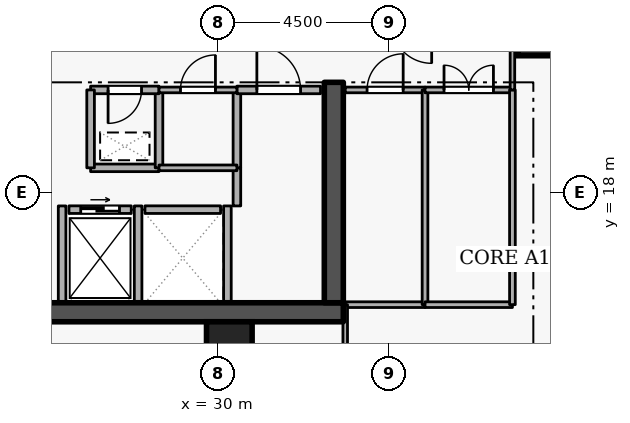
"""IFC4 building model, lengths in metres.
Left out: names, types, materials, properties, quantities, classifications, styles, units other than length and angle.
Written with IfcOpenShell. Run it as: python <this file> out.ifc"""

import sys

from ifc_helpers import new_model, si_unit, direction, frame, frame_2d, origin, origin_2d, place, context, subcontext, project, spatial, rectangle, extrude, element, fill, save


model = new_model("IFC4")
c1 = context("Model", 3, precision=1e-05, world=origin(), true_north=direction((0.0, 1.0)))
c2 = subcontext(c1, "Body", "Model", "MODEL_VIEW")
j1 = project(units=[si_unit("LENGTHUNIT", "METRE"), si_unit("PLANEANGLEUNIT", "RADIAN")], contexts=[c1])
p1 = place(None, origin())
s1 = spatial("IfcSite", under=j1, at=p1, CompositionType="ELEMENT")
p2 = place(p1, origin())
s2 = spatial("IfcBuilding", under=s1, at=p2, CompositionType="ELEMENT")
p3 = place(p2, frame((0.0, 0.0, 130.5)))
s3 = spatial("IfcBuildingStorey", under=s2, at=p3, CompositionType="ELEMENT", Elevation=130.5)
p4 = place(p3, frame((17.7, 14.85, 0.0), z_axis=(0.0, 0.0, 1.0), x_axis=(1.0, 0.0, 0.0)))
e1 = element("IfcWall", 1, at=p4, inside=s3, PredefinedType="SHEAR", context=c2, shape_type="SweptSolid", body=[
    extrude(rectangle(XDim=15.6, YDim=0.5, at=frame_2d((7.8, 0.0))), origin(), (0.0, 0.0, 1.0), 3.6),
])
p5 = place(p3, frame((33.05, 15.1, 0.0), z_axis=(0.0, 0.0, 1.0), x_axis=(0.0, 1.0, 0.0)))
e2 = element("IfcWall", 2, at=p5, inside=s3, PredefinedType="SHEAR", context=c2, shape_type="SweptSolid", body=[
    extrude(rectangle(XDim=5.8, YDim=0.5, at=frame_2d((2.9, 0.0))), origin(), (0.0, 0.0, 1.0), 3.6),
])
for number, where, z_axis, x_axis in (
    (3, (38.5, 22.2, 0.0), (0.0, 0.0, 1.0), (1.0, 0.0, 0.0)),
    (4, (30.3, 14.0, 0.0), (0.0, 0.0, 1.0), (1.0, 0.0, 0.0)),
):
    element("IfcColumn", number, at=place(p3, frame(where, z_axis=z_axis, x_axis=x_axis)), inside=s3, PredefinedType="COLUMN", context=c2, shape_type="SweptSolid", body=[
        extrude(rectangle(XDim=1.2, YDim=1.2, at=origin_2d()), origin(), (0.0, 0.0, 1.0), 3.6),
    ])
p6 = place(p3, frame((26.08, 17.55, 0.0), z_axis=(0.0, 0.0, 1.0), x_axis=(1.0, 0.0, 0.0)))
e5 = element("IfcWall", 5, at=p6, inside=s3, PredefinedType="STANDARD", context=c2, shape_type="SweptSolid", body=[
    extrude(rectangle(XDim=1.64, YDim=0.2, at=frame_2d((0.82, 0.0))), origin(), (0.0, 0.0, 1.0), 3.34),
])
p7 = place(p6, frame((0.31, 0.0, 0.0)))
e6 = element("IfcOpeningElement", 6, at=p7, cuts=e5, PredefinedType="OPENING", context=c2, shape_type="SweptSolid", body=[
    extrude(rectangle(XDim=1.02, YDim=2.06, at=frame_2d((0.51, 1.03))), frame((0.0, 0.11, 0.0), z_axis=(0.0, -1.0, 0.0), x_axis=(1.0, 0.0, 0.0)), (0.0, 0.0, 1.0), 0.22),
])
p8 = place(p3, frame((28.08, 17.55, 0.0), z_axis=(0.0, 0.0, 1.0), x_axis=(1.0, 0.0, 0.0)))
e7 = element("IfcWall", 7, at=p8, inside=s3, PredefinedType="STANDARD", context=c2, shape_type="SweptSolid", body=[
    extrude(rectangle(XDim=1.99, YDim=0.2, at=frame_2d((0.995, 0.0))), origin(), (0.0, 0.0, 1.0), 3.34),
])
for number, where, z_axis, x_axis in (
    (8, (27.9, 15.112, 0.0), (0.0, 0.0, 1.0), (0.0, 1.0, 0.0)),
    (9, (25.9, 15.112, 0.0), (0.0, 0.0, 1.0), (0.0, 1.0, 0.0)),
    (10, (30.25, 15.112, 0.0), (0.0, 0.0, 1.0), (0.0, 1.0, 0.0)),
):
    element("IfcWall", number, at=place(p3, frame(where, z_axis=z_axis, x_axis=x_axis)), inside=s3, PredefinedType="STANDARD", context=c2, shape_type="SweptSolid", body=[
        extrude(rectangle(XDim=2.536, YDim=0.2, at=frame_2d((1.268, 0.0))), origin(), (0.0, 0.0, 1.0), 3.34),
    ])
p9 = place(p3, frame((26.65, 18.65, 0.0), z_axis=(0.0, 0.0, 1.0), x_axis=(1.0, 0.0, 0.0)))
e11 = element("IfcWall", 11, at=p9, inside=s3, PredefinedType="STANDARD", context=c2, shape_type="SweptSolid", body=[
    extrude(rectangle(XDim=1.8, YDim=0.2, at=frame_2d((0.9, 0.0))), origin(), (0.0, 0.0, 1.0), 3.34),
])
p10 = place(p3, frame((28.45, 18.65, 0.0), z_axis=(0.0, 0.0, 1.0), x_axis=(0.0, 1.0, 0.0)))
e12 = element("IfcWall", 12, at=p10, inside=s3, PredefinedType="STANDARD", context=c2, shape_type="SweptSolid", body=[
    extrude(rectangle(XDim=2.05, YDim=0.2, at=frame_2d((1.025, 0.0))), origin(), (0.0, 0.0, 1.0), 3.34),
])
p11 = place(p3, frame((28.45, 20.7, 0.0), z_axis=(0.0, 0.0, 1.0), x_axis=(-1.0, 0.0, 0.0)))
e13 = element("IfcWall", 13, at=p11, inside=s3, PredefinedType="STANDARD", context=c2, shape_type="SweptSolid", body=[
    extrude(rectangle(XDim=1.8, YDim=0.2, at=frame_2d((0.9, 0.0))), origin(), (0.0, 0.0, 1.0), 3.34),
])
p12 = place(p11, frame((0.46, 0.0, 0.0)))
e14 = element("IfcOpeningElement", 14, at=p12, cuts=e13, PredefinedType="OPENING", context=c2, shape_type="SweptSolid", body=[
    extrude(rectangle(XDim=0.88, YDim=2.04, at=frame_2d((0.44, 1.02))), frame((0.0, 0.11, 0.0), z_axis=(0.0, -1.0, 0.0), x_axis=(1.0, 0.0, 0.0)), (0.0, 0.0, 1.0), 0.22),
])
p13 = place(p3, frame((26.65, 20.7, 0.0), z_axis=(0.0, 0.0, 1.0), x_axis=(0.0, -1.0, 0.0)))
e15 = element("IfcWall", 15, at=p13, inside=s3, PredefinedType="STANDARD", context=c2, shape_type="SweptSolid", body=[
    extrude(rectangle(XDim=2.05, YDim=0.2, at=frame_2d((1.025, 0.0))), origin(), (0.0, 0.0, 1.0), 3.34),
])
p14 = place(p3, frame((30.5, 17.648, 0.0), z_axis=(0.0, 0.0, 1.0), x_axis=(0.0, 1.0, 0.0)))
e16 = element("IfcWall", 16, at=p14, inside=s3, PredefinedType="STANDARD", context=c2, shape_type="SweptSolid", body=[
    extrude(rectangle(XDim=1.002, YDim=0.2, at=frame_2d((0.501, 0.0))), origin(), (0.0, 0.0, 1.0), 3.34),
])
p15 = place(p3, frame((30.5, 18.65, 0.0), z_axis=(0.0, 0.0, 1.0), x_axis=(0.0, 1.0, 0.0)))
e17 = element("IfcWall", 17, at=p15, inside=s3, PredefinedType="STANDARD", context=c2, shape_type="SweptSolid", body=[
    extrude(rectangle(XDim=2.05, YDim=0.2, at=frame_2d((1.025, 0.0))), origin(), (0.0, 0.0, 1.0), 3.34),
])
p16 = place(p3, frame((30.5, 20.7, 0.0), z_axis=(0.0, 0.0, 1.0), x_axis=(1.0, 0.0, 0.0)))
e18 = element("IfcWall", 18, at=p16, inside=s3, PredefinedType="STANDARD", context=c2, shape_type="SweptSolid", body=[
    extrude(rectangle(XDim=2.2, YDim=0.2, at=frame_2d((1.1, 0.0))), origin(), (0.0, 0.0, 1.0), 3.34),
])
p17 = place(p16, frame((0.525, 0.0, 0.0)))
e19 = element("IfcOpeningElement", 19, at=p17, cuts=e18, PredefinedType="OPENING", context=c2, shape_type="SweptSolid", body=[
    extrude(rectangle(XDim=1.15, YDim=2.1, at=frame_2d((0.575, 1.05))), frame((0.0, 0.11, 0.0), z_axis=(0.0, -1.0, 0.0), x_axis=(1.0, 0.0, 0.0)), (0.0, 0.0, 1.0), 0.22),
])
p18 = place(p3, frame((30.5, 18.65, 0.0), z_axis=(0.0, 0.0, 1.0), x_axis=(-1.0, 0.0, 0.0)))
e20 = element("IfcWall", 20, at=p18, inside=s3, PredefinedType="PARTITIONING", context=c2, shape_type="SweptSolid", body=[
    extrude(rectangle(XDim=2.05, YDim=0.15, at=frame_2d((1.025, 0.0))), origin(), (0.0, 0.0, 1.0), 3.34),
])
p19 = place(p3, frame((28.45, 20.7, 0.0), z_axis=(0.0, 0.0, 1.0), x_axis=(1.0, 0.0, 0.0)))
e21 = element("IfcWall", 21, at=p19, inside=s3, PredefinedType="PARTITIONING", context=c2, shape_type="SweptSolid", body=[
    extrude(rectangle(XDim=2.05, YDim=0.15, at=frame_2d((1.025, 0.0))), origin(), (0.0, 0.0, 1.0), 3.34),
])
p20 = place(p19, frame((0.565, 0.0, 0.0)))
e22 = element("IfcOpeningElement", 22, at=p20, cuts=e21, PredefinedType="OPENING", context=c2, shape_type="SweptSolid", body=[
    extrude(rectangle(XDim=0.92, YDim=2.08, at=frame_2d((0.46, 1.04))), frame((0.0, 0.085, 0.0), z_axis=(0.0, -1.0, 0.0), x_axis=(1.0, 0.0, 0.0)), (0.0, 0.0, 1.0), 0.17),
])
p21 = place(p3, frame((35.45, 15.05, 0.0), z_axis=(0.0, 0.0, 1.0), x_axis=(-1.0, 0.0, 0.0)))
e23 = element("IfcWall", 23, at=p21, inside=s3, PredefinedType="PARTITIONING", context=c2, shape_type="SweptSolid", body=[
    extrude(rectangle(XDim=2.1, YDim=0.15, at=frame_2d((1.05, 0.0))), origin(), (0.0, 0.0, 1.0), 3.34),
])
p22 = place(p3, frame((33.35, 20.7, 0.0), z_axis=(0.0, 0.0, 1.0), x_axis=(1.0, 0.0, 0.0)))
e24 = element("IfcWall", 24, at=p22, inside=s3, PredefinedType="PARTITIONING", context=c2, shape_type="SweptSolid", body=[
    extrude(rectangle(XDim=2.1, YDim=0.15, at=frame_2d((1.05, 0.0))), origin(), (0.0, 0.0, 1.0), 3.34),
])
p23 = place(p22, frame((0.575, 0.0, 0.0)))
e25 = element("IfcOpeningElement", 25, at=p23, cuts=e24, PredefinedType="OPENING", context=c2, shape_type="SweptSolid", body=[
    extrude(rectangle(XDim=0.95, YDim=2.1, at=frame_2d((0.475, 1.05))), frame((0.0, 0.085, 0.0), z_axis=(0.0, -1.0, 0.0), x_axis=(1.0, 0.0, 0.0)), (0.0, 0.0, 1.0), 0.17),
])
p24 = place(p3, frame((35.45, 20.7, 0.0), z_axis=(0.0, 0.0, 1.0), x_axis=(0.0, -1.0, 0.0)))
e26 = element("IfcWall", 26, at=p24, inside=s3, PredefinedType="PARTITIONING", context=c2, shape_type="SweptSolid", body=[
    extrude(rectangle(XDim=5.65, YDim=0.15, at=frame_2d((2.825, 0.0))), origin(), (0.0, 0.0, 1.0), 3.34),
])
p25 = place(p3, frame((37.75, 15.05, 0.0), z_axis=(0.0, 0.0, 1.0), x_axis=(-1.0, 0.0, 0.0)))
e27 = element("IfcWall", 27, at=p25, inside=s3, PredefinedType="PARTITIONING", context=c2, shape_type="SweptSolid", body=[
    extrude(rectangle(XDim=2.3, YDim=0.15, at=frame_2d((1.15, 0.0))), origin(), (0.0, 0.0, 1.0), 3.34),
])
p26 = place(p3, frame((35.45, 20.7, 0.0), z_axis=(0.0, 0.0, 1.0), x_axis=(1.0, 0.0, 0.0)))
e28 = element("IfcWall", 28, at=p26, inside=s3, PredefinedType="PARTITIONING", context=c2, shape_type="SweptSolid", body=[
    extrude(rectangle(XDim=2.3, YDim=0.15, at=frame_2d((1.15, 0.0))), origin(), (0.0, 0.0, 1.0), 3.34),
])
p27 = place(p26, frame((0.5, 0.0, 0.0)))
e29 = element("IfcOpeningElement", 29, at=p27, cuts=e28, PredefinedType="OPENING", context=c2, shape_type="SweptSolid", body=[
    extrude(rectangle(XDim=1.3, YDim=2.12, at=frame_2d((0.65, 1.06))), frame((0.0, 0.085, 0.0), z_axis=(0.0, -1.0, 0.0), x_axis=(1.0, 0.0, 0.0)), (0.0, 0.0, 1.0), 0.17),
])
p28 = place(p3, frame((37.75, 20.7, 0.0), z_axis=(0.0, 0.0, 1.0), x_axis=(0.0, -1.0, 0.0)))
e30 = element("IfcWall", 30, at=p28, inside=s3, PredefinedType="PARTITIONING", context=c2, shape_type="SweptSolid", body=[
    extrude(rectangle(XDim=5.65, YDim=0.15, at=frame_2d((2.825, 0.0))), origin(), (0.0, 0.0, 1.0), 3.34),
])
p29 = place(p3, frame((33.35, 3.28, 0.0), z_axis=(0.0, 0.0, 1.0), x_axis=(0.0, 1.0, 0.0)))
e31 = element("IfcWall", 31, at=p29, inside=s3, PredefinedType="PARTITIONING", context=c2, shape_type="SweptSolid", body=[
    extrude(rectangle(XDim=11.77, YDim=0.12, at=frame_2d((5.885, 0.0))), origin(), (0.0, 0.0, 1.0), 2.545),
])
p30 = place(p3, frame((37.75, 20.7, 0.0), z_axis=(0.0, 0.0, 1.0), x_axis=(0.0, 1.0, 0.0)))
e32 = element("IfcWall", 32, at=p30, inside=s3, PredefinedType="PARTITIONING", context=c2, shape_type="SweptSolid", body=[
    extrude(rectangle(XDim=1.75, YDim=0.12, at=frame_2d((0.875, 0.0))), origin(), (0.0, 0.0, 1.0), 3.34),
])
p31 = place(p7, origin())
e33 = element("IfcDoor", 33, at=p31, inside=s3, OperationType="SLIDING_TO_LEFT", PredefinedType="DOOR", context=c2, shape_type="SweptSolid", body=[
    extrude(rectangle(XDim=1.02, YDim=2.06, at=frame_2d((0.51, 1.03))), frame((0.0, 0.025, 0.0), z_axis=(0.0, -1.0, 0.0), x_axis=(1.0, 0.0, 0.0)), (0.0, 0.0, 1.0), 0.05),
])
fill(e6, e33)
p32 = place(p12, origin())
e34 = element("IfcDoor", 34, at=p32, inside=s3, OperationType="SINGLE_SWING_RIGHT", PredefinedType="DOOR", context=c2, shape_type="SweptSolid", body=[
    extrude(rectangle(XDim=0.88, YDim=2.04, at=frame_2d((0.44, 1.02))), frame((0.0, 0.025, 0.0), z_axis=(0.0, -1.0, 0.0), x_axis=(1.0, 0.0, 0.0)), (0.0, 0.0, 1.0), 0.05),
])
fill(e14, e34)
p33 = place(p20, origin())
e35 = element("IfcDoor", 35, at=p33, inside=s3, OperationType="SINGLE_SWING_RIGHT", PredefinedType="DOOR", context=c2, shape_type="SweptSolid", body=[
    extrude(rectangle(XDim=0.92, YDim=2.08, at=frame_2d((0.46, 1.04))), frame((0.0, 0.025, 0.0), z_axis=(0.0, -1.0, 0.0), x_axis=(1.0, 0.0, 0.0)), (0.0, 0.0, 1.0), 0.05),
])
fill(e22, e35)
p34 = place(p17, origin())
e36 = element("IfcDoor", 36, at=p34, inside=s3, OperationType="SINGLE_SWING_LEFT", PredefinedType="DOOR", context=c2, shape_type="SweptSolid", body=[
    extrude(rectangle(XDim=1.15, YDim=2.1, at=frame_2d((0.575, 1.05))), frame((0.0, 0.025, 0.0), z_axis=(0.0, -1.0, 0.0), x_axis=(1.0, 0.0, 0.0)), (0.0, 0.0, 1.0), 0.05),
])
fill(e19, e36)
p35 = place(p23, origin())
e37 = element("IfcDoor", 37, at=p35, inside=s3, OperationType="SINGLE_SWING_RIGHT", PredefinedType="DOOR", context=c2, shape_type="SweptSolid", body=[
    extrude(rectangle(XDim=0.95, YDim=2.1, at=frame_2d((0.475, 1.05))), frame((0.0, 0.025, 0.0), z_axis=(0.0, -1.0, 0.0), x_axis=(1.0, 0.0, 0.0)), (0.0, 0.0, 1.0), 0.05),
])
fill(e25, e37)
p36 = place(p27, origin())
e38 = element("IfcDoor", 38, at=p36, inside=s3, OperationType="DOUBLE_DOOR_SINGLE_SWING", PredefinedType="DOOR", context=c2, shape_type="SweptSolid", body=[
    extrude(rectangle(XDim=1.3, YDim=2.12, at=frame_2d((0.65, 1.06))), frame((0.0, 0.025, 0.0), z_axis=(0.0, -1.0, 0.0), x_axis=(1.0, 0.0, 0.0)), (0.0, 0.0, 1.0), 0.05),
])
fill(e29, e38)
save(model, sys.argv[1])
